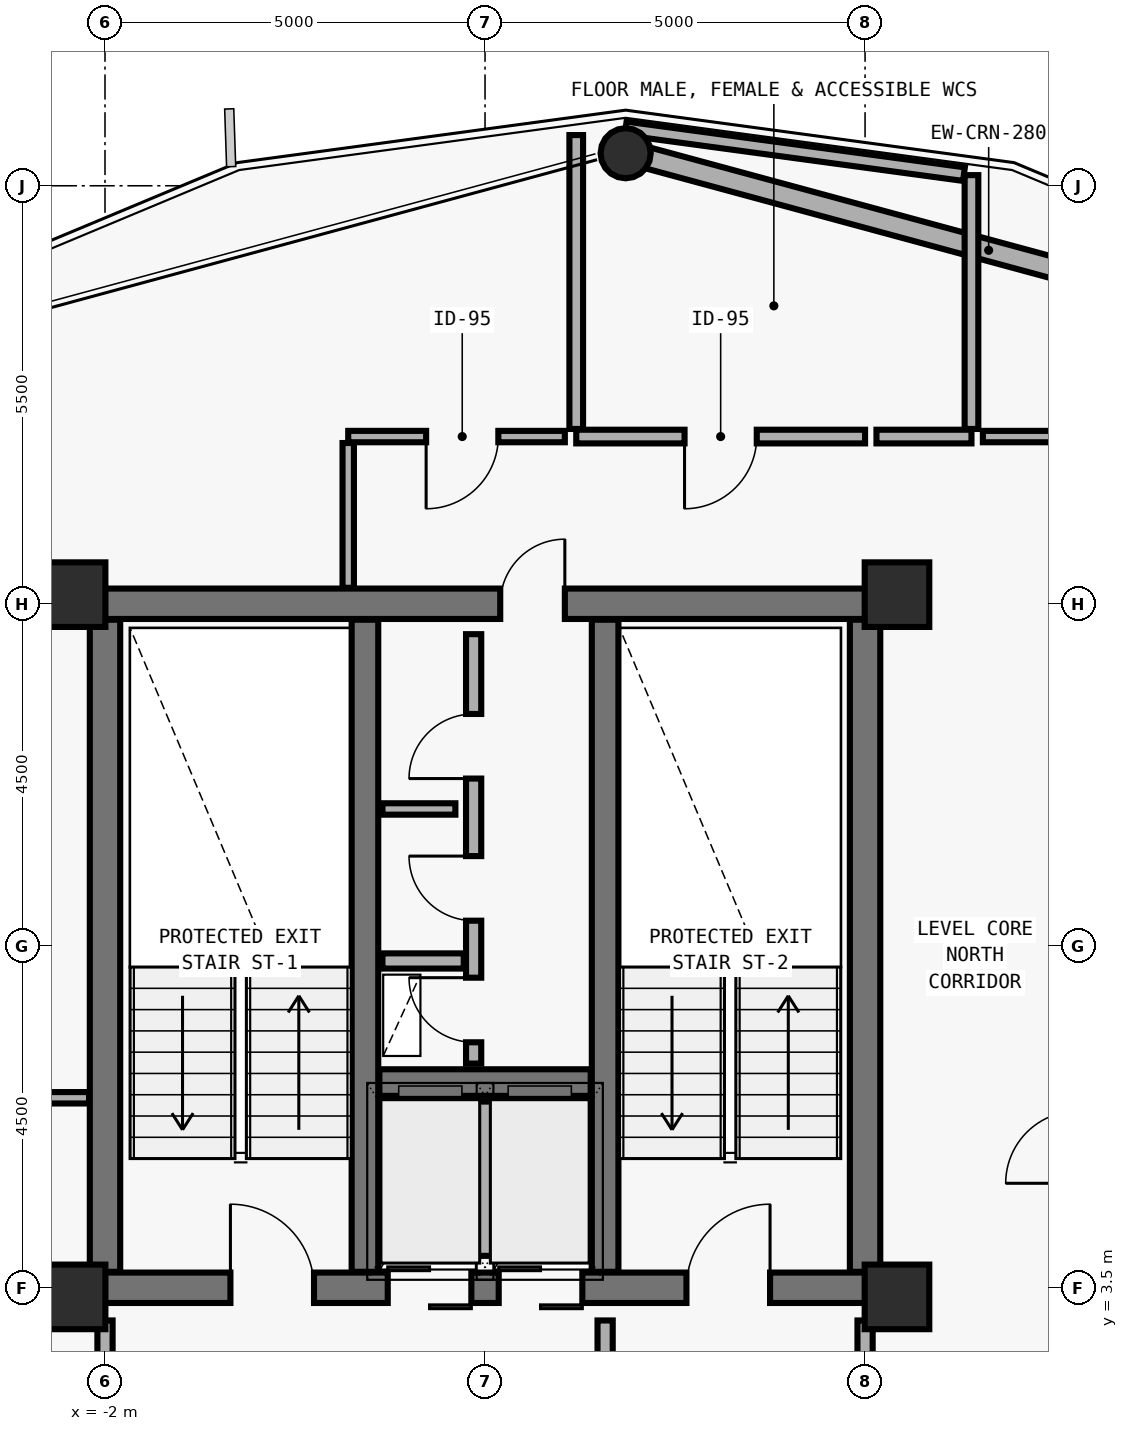
"""IFC4 building model, lengths in metres.
Left out: names, types, materials, properties, quantities, classifications, styles, units other than length and angle.
Written with IfcOpenShell. Run it as: python <this file> out.ifc"""

import sys

from ifc_helpers import new_model, si_unit, direction, frame, frame_2d, origin, origin_2d, place, context, subcontext, project, spatial, rectangle, hollow_circle, extrude, element, fill, save


model = new_model("IFC4")
c1 = context("Model", 3, precision=1e-05, world=origin(), true_north=direction((0.0, 1.0)))
c2 = subcontext(c1, "Body", "Model", "MODEL_VIEW")
j1 = project(units=[si_unit("LENGTHUNIT", "METRE"), si_unit("PLANEANGLEUNIT", "RADIAN")], contexts=[c1])
p1 = place(None, origin())
s1 = spatial("IfcSite", under=j1, at=p1, CompositionType="ELEMENT")
p2 = place(p1, origin())
s2 = spatial("IfcBuilding", under=s1, at=p2, CompositionType="ELEMENT")
p3 = place(p2, frame((0.0, 0.0, 207.6)))
s3 = spatial("IfcBuildingStorey", under=s2, at=p3, CompositionType="ELEMENT", Elevation=207.6)
p4 = place(p3, frame((-2.0, 3.5, 0.0), z_axis=(0.0, 0.0, 1.0), x_axis=(1.0, 0.0, 0.0)))
e1 = element("IfcWall", 1, at=p4, inside=s3, PredefinedType="SHEAR", context=c2, shape_type="SweptSolid", body=[
    extrude(rectangle(XDim=10.0, YDim=0.4, at=frame_2d((5.0, 0.0))), origin(), (0.0, 0.0, 1.0), 3.592),
])
p5 = place(p4, frame((1.65, 0.0, 0.0)))
e2 = element("IfcOpeningElement", 2, at=p5, cuts=e1, PredefinedType="OPENING", context=c2, shape_type="SweptSolid", body=[
    extrude(rectangle(XDim=1.1, YDim=2.15, at=frame_2d((0.55, 1.075))), frame((0.0, 0.21, 0.0), z_axis=(0.0, -1.0, 0.0), x_axis=(1.0, 0.0, 0.0)), (0.0, 0.0, 1.0), 0.42),
])
p6 = place(p4, frame((7.65, 0.0, 0.0)))
e3 = element("IfcOpeningElement", 3, at=p6, cuts=e1, PredefinedType="OPENING", context=c2, shape_type="SweptSolid", body=[
    extrude(rectangle(XDim=1.1, YDim=2.15, at=frame_2d((0.55, 1.075))), frame((0.0, 0.21, 0.0), z_axis=(0.0, -1.0, 0.0), x_axis=(1.0, 0.0, 0.0)), (0.0, 0.0, 1.0), 0.42),
])
p7 = place(p4, frame((3.72, 0.0, 0.0)))
e4 = element("IfcOpeningElement", 4, at=p7, cuts=e1, PredefinedType="OPENING", context=c2, shape_type="SweptSolid", body=[
    extrude(rectangle(XDim=1.1, YDim=2.2, at=frame_2d((0.55, 1.1))), frame((0.0, 0.21, 0.0), z_axis=(0.0, -1.0, 0.0), x_axis=(1.0, 0.0, 0.0)), (0.0, 0.0, 1.0), 0.42),
])
p8 = place(p4, frame((5.18, 0.0, 0.0)))
e5 = element("IfcOpeningElement", 5, at=p8, cuts=e1, PredefinedType="OPENING", context=c2, shape_type="SweptSolid", body=[
    extrude(rectangle(XDim=1.1, YDim=2.2, at=frame_2d((0.55, 1.1))), frame((0.0, 0.21, 0.0), z_axis=(0.0, -1.0, 0.0), x_axis=(1.0, 0.0, 0.0)), (0.0, 0.0, 1.0), 0.42),
])
p9 = place(p3, frame((-2.0, 12.5, 0.0), z_axis=(0.0, 0.0, 1.0), x_axis=(1.0, 0.0, 0.0)))
e6 = element("IfcWall", 6, at=p9, inside=s3, PredefinedType="SHEAR", context=c2, shape_type="SweptSolid", body=[
    extrude(rectangle(XDim=10.0, YDim=0.4, at=frame_2d((5.0, 0.0))), origin(), (0.0, 0.0, 1.0), 3.592),
])
p10 = place(p9, frame((5.2, 0.0, 0.0)))
e7 = element("IfcOpeningElement", 7, at=p10, cuts=e6, PredefinedType="OPENING", context=c2, shape_type="SweptSolid", body=[
    extrude(rectangle(XDim=0.85, YDim=2.1, at=frame_2d((0.425, 1.05))), frame((0.0, 0.21, 0.0), z_axis=(0.0, -1.0, 0.0), x_axis=(1.0, 0.0, 0.0)), (0.0, 0.0, 1.0), 0.42),
])
for number, where, z_axis, x_axis in (
    (8, (-2.0, 3.71, 0.0), (0.0, 0.0, 1.0), (0.0, 1.0, 0.0)),
    (9, (8.0, 3.71, 0.0), (0.0, 0.0, 1.0), (0.0, 1.0, 0.0)),
):
    element("IfcWall", number, at=place(p3, frame(where, z_axis=z_axis, x_axis=x_axis)), inside=s3, PredefinedType="SHEAR", context=c2, shape_type="SweptSolid", body=[
        extrude(rectangle(XDim=8.58, YDim=0.4, at=frame_2d((4.29, 0.0))), origin(), (0.0, 0.0, 1.0), 3.592),
    ])
for number, where, z_axis, x_axis in (
    (10, (1.42, 3.71, 0.0), (0.0, 0.0, 1.0), (0.0, 1.0, 0.0)),
    (11, (4.58, 3.71, 0.0), (0.0, 0.0, 1.0), (0.0, 1.0, 0.0)),
):
    element("IfcWall", number, at=place(p3, frame(where, z_axis=z_axis, x_axis=x_axis)), inside=s3, PredefinedType="SHEAR", context=c2, shape_type="SweptSolid", body=[
        extrude(rectangle(XDim=8.58, YDim=0.35, at=frame_2d((4.29, 0.0))), origin(), (0.0, 0.0, 1.0), 3.592),
    ])
p11 = place(p3, frame((1.61, 6.2, 0.0), z_axis=(0.0, 0.0, 1.0), x_axis=(1.0, 0.0, 0.0)))
e12 = element("IfcWall", 12, at=p11, inside=s3, PredefinedType="SHEAR", context=c2, shape_type="SweptSolid", body=[
    extrude(rectangle(XDim=2.78, YDim=0.35, at=frame_2d((1.39, 0.0))), origin(), (0.0, 0.0, 1.0), 3.592),
])
for number, where, z_axis, x_axis in (
    (13, (-2.42, 12.62, 0.0), (0.0, 0.0, 1.0), (1.0, 0.0, 0.0)),
    (14, (8.42, 12.62, 0.0), (0.0, 0.0, 1.0), (1.0, 0.0, 0.0)),
    (15, (-2.42, 3.38, 0.0), (0.0, 0.0, 1.0), (1.0, 0.0, 0.0)),
    (16, (8.42, 3.38, 0.0), (0.0, 0.0, 1.0), (1.0, 0.0, 0.0)),
):
    element("IfcColumn", number, at=place(p3, frame(where, z_axis=z_axis, x_axis=x_axis)), inside=s3, PredefinedType="COLUMN", context=c2, shape_type="SweptSolid", body=[
        extrude(rectangle(XDim=0.85, YDim=0.85, at=origin_2d()), origin(), (0.0, 0.0, 1.0), 3.575),
    ])
p12 = place(p3, frame((4.85, 18.445, 0.0), z_axis=(0.0, -0.00956044538, 0.999954297898), x_axis=(1.0, 0.0, 0.0)))
e17 = element("IfcColumn", 17, at=p12, inside=s3, PredefinedType="COLUMN", context=c2, shape_type="SweptSolid", body=[
    extrude(hollow_circle(Radius=0.33, WallThickness=0.025, at=origin_2d()), origin(), (0.0, 0.0, 1.0), 3.575),
])
p13 = place(p3, frame((5.125, 18.371, 0.0), z_axis=(0.0, 0.0, 1.0), x_axis=(0.965198020843, -0.261520134139, 0.0)))
e18 = element("IfcWall", 18, at=p13, inside=s3, PredefinedType="SOLIDWALL", context=c2, shape_type="SweptSolid", body=[
    extrude(rectangle(XDim=9.327, YDim=0.28, at=frame_2d((4.664, 0.0))), origin(), (0.0, 0.0, 1.0), 2.93),
])
p14 = place(p3, frame((3.0, 3.92, 0.0), z_axis=(0.0, 0.0, 1.0), x_axis=(0.0, 1.0, 0.0)))
e19 = element("IfcWall", 19, at=p14, inside=s3, PredefinedType="SOLIDWALL", context=c2, shape_type="SweptSolid", body=[
    extrude(rectangle(XDim=2.03, YDim=0.2, at=frame_2d((1.015, 0.0))), origin(), (0.0, 0.0, 1.0), 3.36),
])
p15 = place(p3, frame((1.65, 7.8, 0.0), z_axis=(0.0, 0.0, 1.0), x_axis=(1.0, 0.0, 0.0)))
e20 = element("IfcWall", 20, at=p15, inside=s3, PredefinedType="SOLIDWALL", context=c2, shape_type="SweptSolid", body=[
    extrude(rectangle(XDim=1.07, YDim=0.2, at=frame_2d((0.535, 0.0))), origin(), (0.0, 0.0, 1.0), 3.36),
])
p16 = place(p3, frame((2.85, 6.45, 0.0), z_axis=(0.0, 0.0, 1.0), x_axis=(0.0, 1.0, 0.0)))
e21 = element("IfcWall", 21, at=p16, inside=s3, PredefinedType="MOVABLE", context=c2, shape_type="SweptSolid", body=[
    extrude(rectangle(XDim=5.65, YDim=0.2, at=frame_2d((2.825, 0.0))), origin(), (0.0, 0.0, 1.0), 3.36),
])
p17 = place(p16, frame((1.88, 0.0, 0.0)))
e22 = element("IfcOpeningElement", 22, at=p17, cuts=e21, PredefinedType="OPENING", context=c2, shape_type="SweptSolid", body=[
    extrude(rectangle(XDim=0.85, YDim=2.05, at=frame_2d((0.425, 1.025))), frame((0.0, 0.11, 0.0), z_axis=(0.0, -1.0, 0.0), x_axis=(1.0, 0.0, 0.0)), (0.0, 0.0, 1.0), 0.22),
])
p18 = place(p16, frame((3.75, 0.0, 0.0)))
e23 = element("IfcOpeningElement", 23, at=p18, cuts=e21, PredefinedType="OPENING", context=c2, shape_type="SweptSolid", body=[
    extrude(rectangle(XDim=0.85, YDim=2.1, at=frame_2d((0.425, 1.05))), frame((0.0, 0.11, 0.0), z_axis=(0.0, -1.0, 0.0), x_axis=(1.0, 0.0, 0.0)), (0.0, 0.0, 1.0), 0.22),
])
p19 = place(p16, frame((0.28, 0.0, 0.0)))
e24 = element("IfcOpeningElement", 24, at=p19, cuts=e21, PredefinedType="OPENING", context=c2, shape_type="SweptSolid", body=[
    extrude(rectangle(XDim=0.85, YDim=2.1, at=frame_2d((0.425, 1.05))), frame((0.0, 0.11, 0.0), z_axis=(0.0, -1.0, 0.0), x_axis=(1.0, 0.0, 0.0)), (0.0, 0.0, 1.0), 0.22),
])
p20 = place(p3, frame((4.58, 0.83, 0.0), z_axis=(0.0, 0.0, 1.0), x_axis=(0.0, 1.0, 0.0)))
e25 = element("IfcWall", 25, at=p20, inside=s3, PredefinedType="MOVABLE", context=c2, shape_type="SweptSolid", body=[
    extrude(rectangle(XDim=2.24, YDim=0.2, at=frame_2d((1.12, 0.0))), origin(), (0.0, 0.0, 1.0), 3.36),
])
p21 = place(p20, frame((0.66, 0.0, 0.0)))
e26 = element("IfcOpeningElement", 26, at=p21, cuts=e25, PredefinedType="OPENING", context=c2, shape_type="SweptSolid", body=[
    extrude(rectangle(XDim=1.0, YDim=2.1, at=frame_2d((0.5, 1.05))), frame((0.0, 0.11, 0.0), z_axis=(0.0, -1.0, 0.0), x_axis=(1.0, 0.0, 0.0)), (0.0, 0.0, 1.0), 0.22),
])
p22 = place(p3, frame((-2.0, 0.72, 0.0), z_axis=(0.0, 0.0, 1.0), x_axis=(0.0, 1.0, 0.0)))
e27 = element("IfcWall", 27, at=p22, inside=s3, PredefinedType="MOVABLE", context=c2, shape_type="SweptSolid", body=[
    extrude(rectangle(XDim=2.35, YDim=0.2, at=frame_2d((1.175, 0.0))), origin(), (0.0, 0.0, 1.0), 2.692),
])
p23 = place(p22, frame((0.845, 0.0, 0.0)))
e28 = element("IfcOpeningElement", 28, at=p23, cuts=e27, PredefinedType="OPENING", context=c2, shape_type="SweptSolid", body=[
    extrude(rectangle(XDim=0.85, YDim=2.1, at=frame_2d((0.425, 1.05))), frame((0.0, 0.11, 0.0), z_axis=(0.0, -1.0, 0.0), x_axis=(1.0, 0.0, 0.0)), (0.0, 0.0, 1.0), 0.22),
])
p24 = place(p3, frame((8.0, 0.72, 0.0), z_axis=(0.0, 0.0, 1.0), x_axis=(0.0, 1.0, 0.0)))
e29 = element("IfcWall", 29, at=p24, inside=s3, PredefinedType="MOVABLE", context=c2, shape_type="SweptSolid", body=[
    extrude(rectangle(XDim=2.35, YDim=0.2, at=frame_2d((1.175, 0.0))), origin(), (0.0, 0.0, 1.0), 2.692),
])
p25 = place(p24, frame((0.845, 0.0, 0.0)))
e30 = element("IfcOpeningElement", 30, at=p25, cuts=e29, PredefinedType="OPENING", context=c2, shape_type="SweptSolid", body=[
    extrude(rectangle(XDim=0.85, YDim=2.1, at=frame_2d((0.425, 1.05))), frame((0.0, 0.11, 0.0), z_axis=(0.0, -1.0, 0.0), x_axis=(1.0, 0.0, 0.0)), (0.0, 0.0, 1.0), 0.22),
])
p26 = place(p3, frame((8.0, 14.7, 0.0), z_axis=(0.0, 0.0, 1.0), x_axis=(-1.0, 0.0, 0.0)))
e31 = element("IfcWall", 31, at=p26, inside=s3, PredefinedType="PLUMBINGWALL", context=c2, shape_type="SweptSolid", body=[
    extrude(rectangle(XDim=3.8, YDim=0.18, at=frame_2d((1.9, 0.0))), origin(), (0.0, 0.0, 1.0), 3.012),
])
p27 = place(p26, frame((1.425, 0.0, 0.0)))
e32 = element("IfcOpeningElement", 32, at=p27, cuts=e31, PredefinedType="OPENING", context=c2, shape_type="SweptSolid", body=[
    extrude(rectangle(XDim=0.95, YDim=2.1, at=frame_2d((0.475, 1.05))), frame((0.0, 0.1, 0.0), z_axis=(0.0, -1.0, 0.0), x_axis=(1.0, 0.0, 0.0)), (0.0, 0.0, 1.0), 0.2),
])
p28 = place(p3, frame((4.05, 14.7, 0.0), z_axis=(0.0, 0.0, 1.0), x_axis=(-1.0, 0.0, 0.0)))
e33 = element("IfcWall", 33, at=p28, inside=s3, PredefinedType="PARTITIONING", context=c2, shape_type="SweptSolid", body=[
    extrude(rectangle(XDim=2.85, YDim=0.15, at=frame_2d((1.425, 0.0))), origin(), (0.0, 0.0, 1.0), 3.012),
])
p29 = place(p28, frame((0.875, 0.0, 0.0)))
e34 = element("IfcOpeningElement", 34, at=p29, cuts=e33, PredefinedType="OPENING", context=c2, shape_type="SweptSolid", body=[
    extrude(rectangle(XDim=0.95, YDim=2.1, at=frame_2d((0.475, 1.05))), frame((0.0, 0.085, 0.0), z_axis=(0.0, -1.0, 0.0), x_axis=(1.0, 0.0, 0.0)), (0.0, 0.0, 1.0), 0.17),
])
p30 = place(p3, frame((1.65, 9.8, 0.0), z_axis=(0.0, 0.0, 1.0), x_axis=(1.0, 0.0, 0.0)))
e35 = element("IfcWall", 35, at=p30, inside=s3, PredefinedType="PARTITIONING", context=c2, shape_type="SweptSolid", body=[
    extrude(rectangle(XDim=0.96, YDim=0.15, at=frame_2d((0.48, 0.0))), origin(), (0.0, 0.0, 1.0), 3.36),
])
p31 = place(p3, frame((9.4, 14.7, 0.0), z_axis=(0.0, 0.0, 1.0), x_axis=(-1.0, 0.0, 0.0)))
e36 = element("IfcWall", 36, at=p31, inside=s3, PredefinedType="PLUMBINGWALL", context=c2, shape_type="SweptSolid", body=[
    extrude(rectangle(XDim=1.25, YDim=0.18, at=frame_2d((0.625, 0.0))), origin(), (0.0, 0.0, 1.0), 3.012),
])
p32 = place(p3, frame((1.2, 14.615, 0.0), z_axis=(0.0, 0.0, 1.0), x_axis=(0.0, -1.0, 0.0)))
e37 = element("IfcWall", 37, at=p32, inside=s3, PredefinedType="PARTITIONING", context=c2, shape_type="SweptSolid", body=[
    extrude(rectangle(XDim=1.905, YDim=0.15, at=frame_2d((0.953, 0.0))), origin(), (0.0, 0.0, 1.0), 3.36),
])
p33 = place(p3, frame((-2.21, 6.0, 0.0), z_axis=(0.0, 0.0, 1.0), x_axis=(-1.0, 0.0, 0.0)))
e38 = element("IfcWall", 38, at=p33, inside=s3, PredefinedType="PARTITIONING", context=c2, shape_type="SweptSolid", body=[
    extrude(rectangle(XDim=2.29, YDim=0.15, at=frame_2d((1.145, 0.0))), origin(), (0.0, 0.0, 1.0), 3.36),
])
p34 = place(p3, frame((4.2, 18.667, 0.0), z_axis=(0.0, 0.0, 1.0), x_axis=(0.0, -1.0, 0.0)))
e39 = element("IfcWall", 39, at=p34, inside=s3, PredefinedType="PLUMBINGWALL", context=c2, shape_type="SweptSolid", body=[
    extrude(rectangle(XDim=3.867, YDim=0.18, at=frame_2d((1.934, 0.0))), origin(), (0.0, 0.0, 1.0), 3.36),
])
p35 = place(p3, frame((10.715, 14.7, 0.0), z_axis=(0.0, 0.0, 1.0), x_axis=(-1.0, 0.0, 0.0)))
e40 = element("IfcWall", 40, at=p35, inside=s3, PredefinedType="PARTITIONING", context=c2, shape_type="SweptSolid", body=[
    extrude(rectangle(XDim=1.165, YDim=0.15, at=frame_2d((0.583, 0.0))), origin(), (0.0, 0.0, 1.0), 3.012),
])
p36 = place(p3, frame((9.4, 14.8, 0.0), z_axis=(0.0, 0.0, 1.0), x_axis=(0.0, 1.0, 0.0)))
e41 = element("IfcWall", 41, at=p36, inside=s3, PredefinedType="PLUMBINGWALL", context=c2, shape_type="SweptSolid", body=[
    extrude(rectangle(XDim=3.34, YDim=0.18, at=frame_2d((1.67, 0.0))), origin(), (0.0, 0.0, 1.0), 3.36),
])
p37 = place(p3, frame((9.301, 18.153, 0.0), z_axis=(0.0, 0.0, 1.0), x_axis=(-0.990982679397, 0.133990033718, 0.0)))
e42 = element("IfcWall", 42, at=p37, inside=s3, PredefinedType="PLUMBINGWALL", context=c2, shape_type="SweptSolid", body=[
    extrude(rectangle(XDim=4.491, YDim=0.18, at=frame_2d((2.246, 0.0))), origin(), (0.0, 0.0, 1.0), 2.942),
])
p38 = place(p5, origin())
e43 = element("IfcDoor", 43, at=p38, inside=s3, OperationType="SINGLE_SWING_LEFT", PredefinedType="DOOR", context=c2, shape_type="SweptSolid", body=[
    extrude(rectangle(XDim=1.1, YDim=2.15, at=frame_2d((0.55, 1.075))), frame((0.0, 0.025, 0.0), z_axis=(0.0, -1.0, 0.0), x_axis=(1.0, 0.0, 0.0)), (0.0, 0.0, 1.0), 0.05),
])
fill(e2, e43)
p39 = place(p6, origin())
e44 = element("IfcDoor", 44, at=p39, inside=s3, OperationType="SINGLE_SWING_RIGHT", PredefinedType="DOOR", context=c2, shape_type="SweptSolid", body=[
    extrude(rectangle(XDim=1.1, YDim=2.15, at=frame_2d((0.55, 1.075))), frame((0.0, 0.025, 0.0), z_axis=(0.0, -1.0, 0.0), x_axis=(1.0, 0.0, 0.0)), (0.0, 0.0, 1.0), 0.05),
])
fill(e3, e44)
p40 = place(p7, origin())
e45 = element("IfcDoor", 45, at=p40, inside=s3, OperationType="DOUBLE_DOOR_SLIDING", PredefinedType="DOOR", context=c2, shape_type="SweptSolid", body=[
    extrude(rectangle(XDim=1.1, YDim=2.2, at=frame_2d((0.55, 1.1))), frame((0.0, 0.025, 0.0), z_axis=(0.0, -1.0, 0.0), x_axis=(1.0, 0.0, 0.0)), (0.0, 0.0, 1.0), 0.05),
])
fill(e4, e45)
p41 = place(p8, origin())
e46 = element("IfcDoor", 46, at=p41, inside=s3, OperationType="DOUBLE_DOOR_SLIDING", PredefinedType="DOOR", context=c2, shape_type="SweptSolid", body=[
    extrude(rectangle(XDim=1.1, YDim=2.2, at=frame_2d((0.55, 1.1))), frame((0.0, 0.025, 0.0), z_axis=(0.0, -1.0, 0.0), x_axis=(1.0, 0.0, 0.0)), (0.0, 0.0, 1.0), 0.05),
])
fill(e5, e46)
p42 = place(p10, origin())
e47 = element("IfcDoor", 47, at=p42, inside=s3, OperationType="SINGLE_SWING_RIGHT", PredefinedType="DOOR", context=c2, shape_type="SweptSolid", body=[
    extrude(rectangle(XDim=0.85, YDim=2.1, at=frame_2d((0.425, 1.05))), frame((0.0, 0.025, 0.0), z_axis=(0.0, -1.0, 0.0), x_axis=(1.0, 0.0, 0.0)), (0.0, 0.0, 1.0), 0.05),
])
fill(e7, e47)
p43 = place(p17, origin())
e48 = element("IfcDoor", 48, at=p43, inside=s3, OperationType="SINGLE_SWING_RIGHT", PredefinedType="DOOR", context=c2, shape_type="SweptSolid", body=[
    extrude(rectangle(XDim=0.85, YDim=2.05, at=frame_2d((0.425, 1.025))), frame((0.0, 0.025, 0.0), z_axis=(0.0, -1.0, 0.0), x_axis=(1.0, 0.0, 0.0)), (0.0, 0.0, 1.0), 0.05),
])
fill(e22, e48)
p44 = place(p18, origin())
e49 = element("IfcDoor", 49, at=p44, inside=s3, OperationType="SINGLE_SWING_LEFT", PredefinedType="DOOR", context=c2, shape_type="SweptSolid", body=[
    extrude(rectangle(XDim=0.85, YDim=2.1, at=frame_2d((0.425, 1.05))), frame((0.0, 0.025, 0.0), z_axis=(0.0, -1.0, 0.0), x_axis=(1.0, 0.0, 0.0)), (0.0, 0.0, 1.0), 0.05),
])
fill(e23, e49)
p45 = place(p19, origin())
e50 = element("IfcDoor", 50, at=p45, inside=s3, OperationType="SINGLE_SWING_RIGHT", PredefinedType="DOOR", context=c2, shape_type="SweptSolid", body=[
    extrude(rectangle(XDim=0.85, YDim=2.1, at=frame_2d((0.425, 1.05))), frame((0.0, 0.025, 0.0), z_axis=(0.0, -1.0, 0.0), x_axis=(1.0, 0.0, 0.0)), (0.0, 0.0, 1.0), 0.05),
])
fill(e24, e50)
p46 = place(p27, origin())
e51 = element("IfcDoor", 51, at=p46, inside=s3, OperationType="SINGLE_SWING_RIGHT", PredefinedType="DOOR", context=c2, shape_type="SweptSolid", body=[
    extrude(rectangle(XDim=0.95, YDim=2.1, at=frame_2d((0.475, 1.05))), frame((0.0, 0.025, 0.0), z_axis=(0.0, -1.0, 0.0), x_axis=(1.0, 0.0, 0.0)), (0.0, 0.0, 1.0), 0.05),
])
fill(e32, e51)
p47 = place(p29, origin())
e52 = element("IfcDoor", 52, at=p47, inside=s3, OperationType="SINGLE_SWING_RIGHT", PredefinedType="DOOR", context=c2, shape_type="SweptSolid", body=[
    extrude(rectangle(XDim=0.95, YDim=2.1, at=frame_2d((0.475, 1.05))), frame((0.0, 0.025, 0.0), z_axis=(0.0, -1.0, 0.0), x_axis=(1.0, 0.0, 0.0)), (0.0, 0.0, 1.0), 0.05),
])
fill(e34, e52)
save(model, sys.argv[1])
